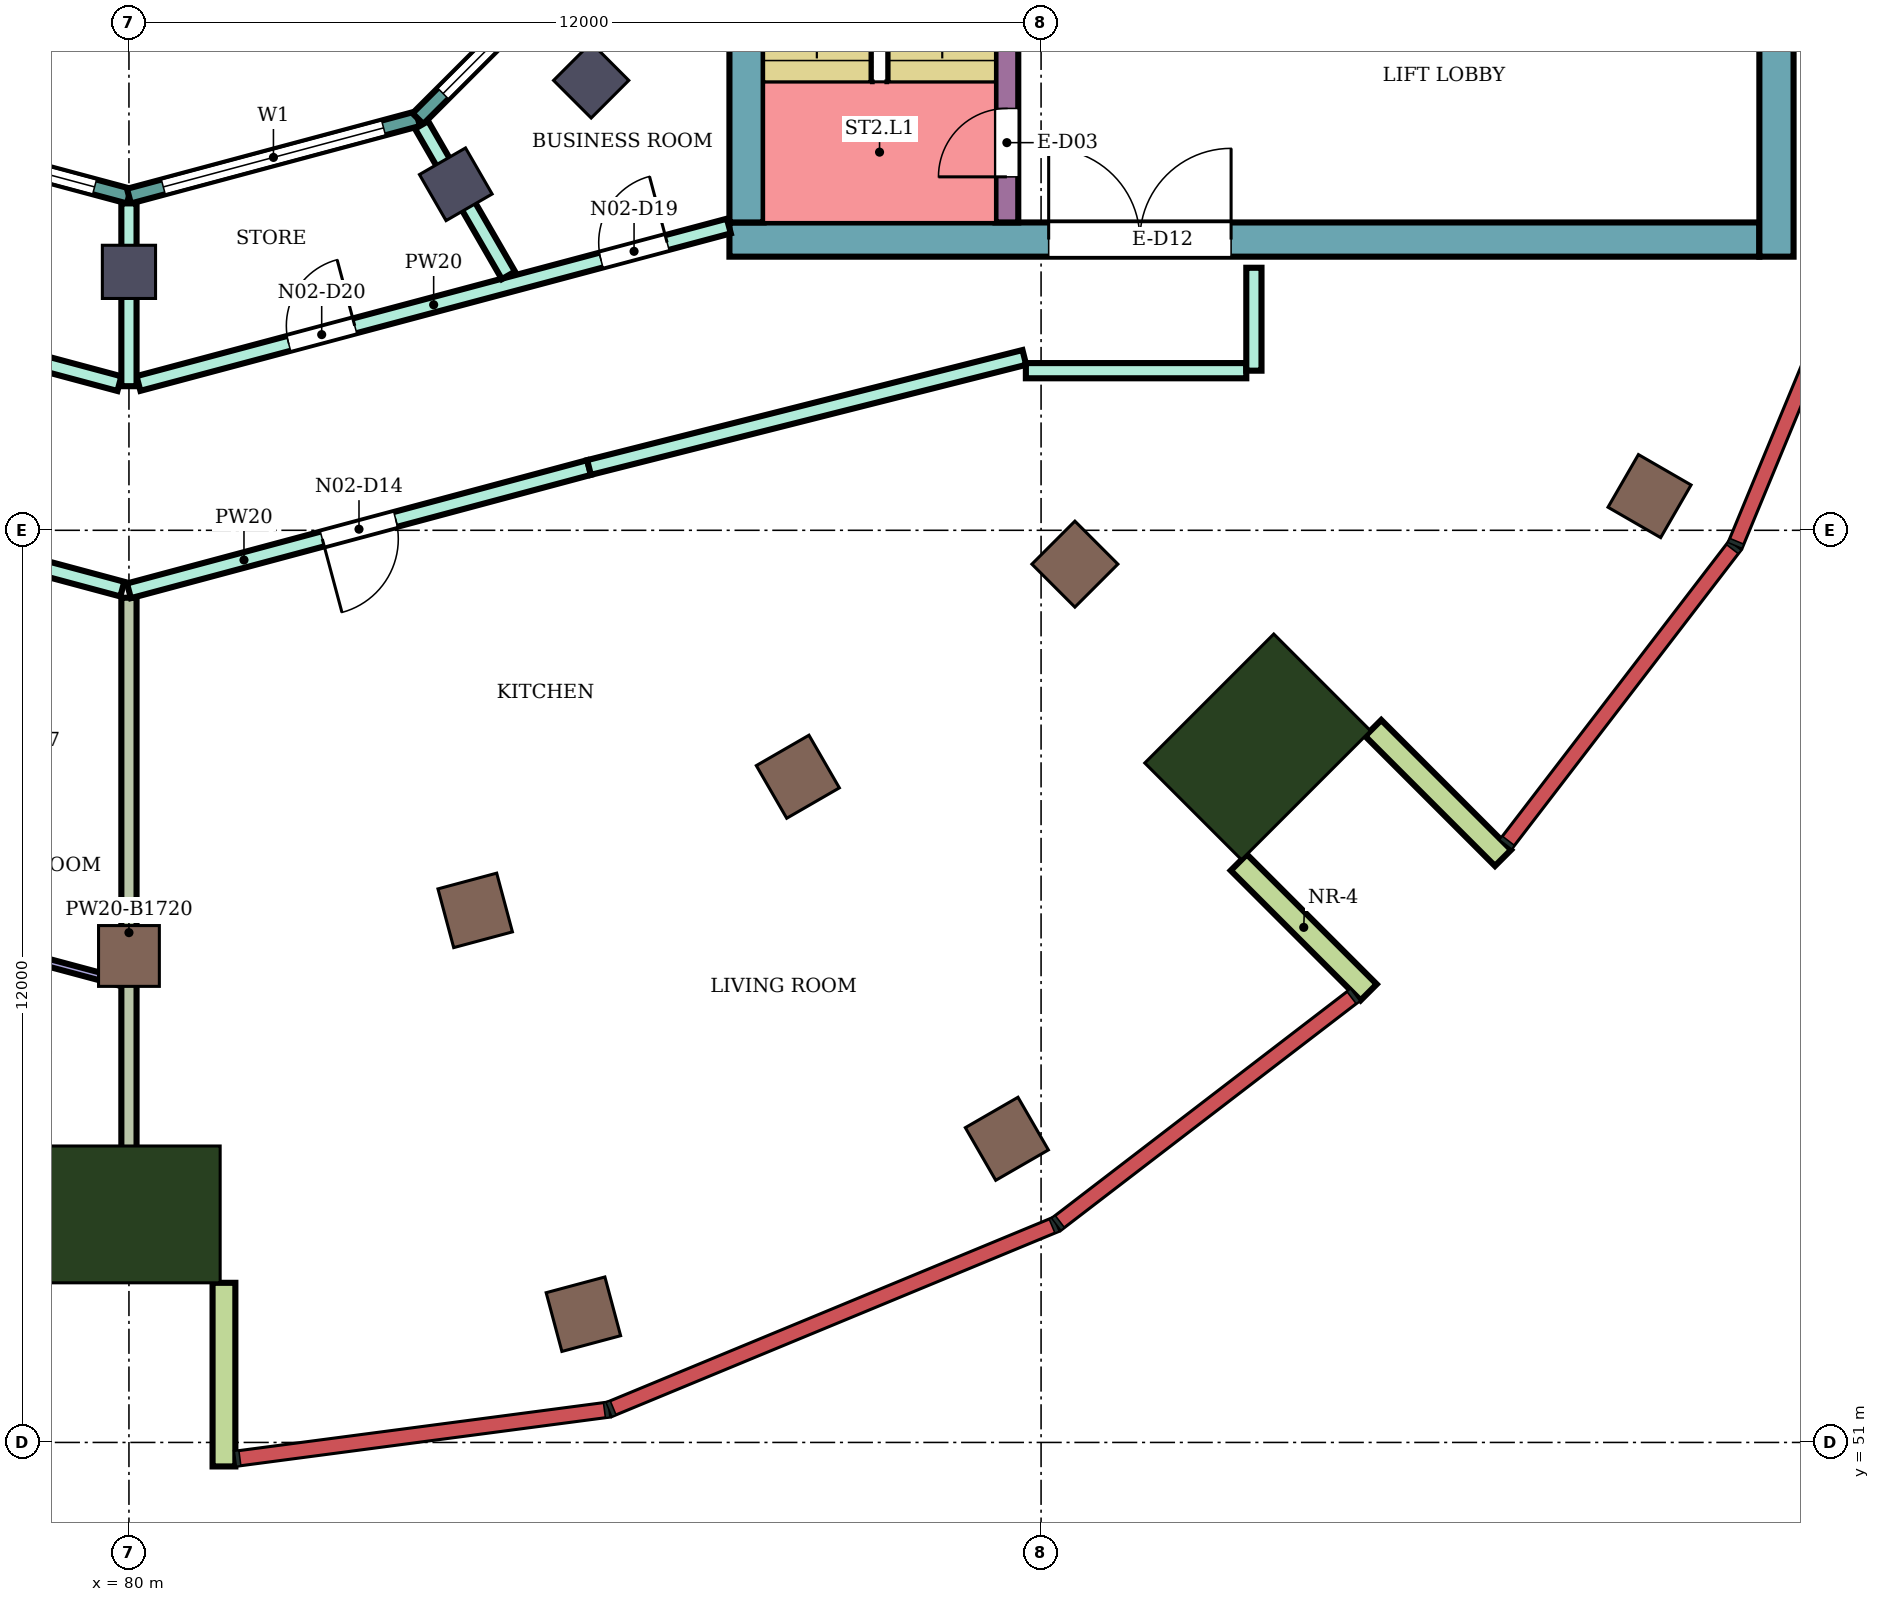
"""IFC4 building model, lengths in metres.
Left out: names, types, materials, properties, quantities, classifications, styles, units other than length and angle.
Written with IfcOpenShell. Run it as: python <this file> out.ifc"""

import sys

from ifc_helpers import new_model, si_unit, direction, frame, frame_2d, origin, origin_2d, place, context, subcontext, project, spatial, rectangle, extrude, element, fill, save


model = new_model("IFC4")
c1 = context("Model", 3, precision=1e-05, world=origin(), true_north=direction((0.0, 1.0)))
c2 = subcontext(c1, "Body", "Model", "MODEL_VIEW")
j1 = project(units=[si_unit("LENGTHUNIT", "METRE"), si_unit("PLANEANGLEUNIT", "RADIAN")], contexts=[c1])
p1 = place(None, origin())
s1 = spatial("IfcSite", under=j1, at=p1, CompositionType="ELEMENT")
p2 = place(p1, origin())
s2 = spatial("IfcBuilding", under=s1, at=p2, CompositionType="ELEMENT")
p3 = place(p2, frame((0.0, 0.0, 288.3)))
s3 = spatial("IfcBuildingStorey", under=s2, at=p3, CompositionType="ELEMENT", Elevation=288.3)
for number, where, z_axis, x_axis in (
    (1, (85.979, 52.687, 0.0), (0.0, 0.0, 1.0), (0.259, -0.966, 0.0)),
    (2, (91.55, 54.995, 0.0), (0.0, 0.0, 1.0), (0.5, -0.866, 0.0)),
    (3, (100.005, 63.45, 0.0), (0.0, 0.0, 1.0), (0.866, -0.5, 0.0)),
    (4, (80.0, 57.4, 0.0), (0.0, 0.0, 1.0), (0.0, -1.0, 0.0)),
    (5, (84.555, 58.0, 0.0), (0.0, 0.0, 1.0), (0.259, -0.966, 0.0)),
    (6, (88.8, 59.758, 0.0), (0.0, 0.0, 1.0), (0.5, -0.866, 0.0)),
    (7, (92.445, 62.555, 0.0), (0.0, 0.0, 1.0), (0.707, -0.707, 0.0)),
):
    element("IfcColumn", number, at=place(p3, frame(where, z_axis=z_axis, x_axis=x_axis)), inside=s3, PredefinedType="COLUMN", context=c2, shape_type="SweptSolid", body=[
        extrude(rectangle(XDim=0.8, YDim=0.8, at=origin_2d()), origin(), (0.0, 0.0, 1.0), 4.2),
    ])
for number, where, z_axis, x_axis in (
    (8, (80.0, 66.4, 0.0), (0.0, 0.0, 1.0), (0.0, -1.0, 0.0)),
    (9, (84.3, 67.552, 0.0), (0.0, 0.0, 1.0), (0.5, -0.866, 0.0)),
    (10, (86.081, 68.919, 0.0), (0.0, 0.0, 1.0), (0.707, -0.707, 0.0)),
):
    element("IfcColumn", number, at=place(p3, frame(where, z_axis=z_axis, x_axis=x_axis)), inside=s3, PredefinedType="COLUMN", context=c2, shape_type="SweptSolid", body=[
        extrude(rectangle(XDim=0.7, YDim=0.7, at=origin_2d()), origin(), (0.0, 0.0, 1.0), 4.2),
    ])
for number, where, z_axis, x_axis in (
    (11, (80.0, 54.0, 0.0), (0.0, 0.0, 1.0), (0.0, -1.0, 0.0)),
    (12, (94.849, 60.151, 0.0), (0.0, 0.0, 1.0), (0.707, -0.707, 0.0)),
):
    element("IfcColumn", number, at=place(p3, frame(where, z_axis=z_axis, x_axis=x_axis)), inside=s3, PredefinedType="COLUMN", context=c2, shape_type="SweptSolid", body=[
        extrude(rectangle(XDim=1.8, YDim=2.4, at=origin_2d()), origin(), (0.0, 0.0, 1.0), 4.2),
    ])
p4 = place(p3, frame((87.9, 66.825, 0.0), z_axis=(0.0, 0.0, 1.0), x_axis=(1.0, 0.0, 0.0)))
e13 = element("IfcWall", 13, at=p4, inside=s3, PredefinedType="SHEAR", context=c2, shape_type="SweptSolid", body=[
    extrude(rectangle(XDim=13.55, YDim=0.45, at=frame_2d((6.775, 0.0))), origin(), (0.0, 0.0, 1.0), 3.88),
])
p5 = place(p4, frame((4.2, 0.0, 0.0)))
e14 = element("IfcOpeningElement", 14, at=p5, cuts=e13, PredefinedType="OPENING", context=c2, shape_type="SweptSolid", body=[
    extrude(rectangle(XDim=2.4, YDim=2.4, at=frame_2d((1.2, 1.2))), frame((0.0, 0.235, 0.0), z_axis=(0.0, -1.0, 0.0), x_axis=(1.0, 0.0, 0.0)), (0.0, 0.0, 1.0), 0.47),
])
p6 = place(p3, frame((88.125, 67.05, 0.0), z_axis=(0.0, 0.0, 1.0), x_axis=(0.0, 1.0, 0.0)))
e15 = element("IfcWall", 15, at=p6, inside=s3, PredefinedType="SHEAR", context=c2, shape_type="SweptSolid", body=[
    extrude(rectangle(XDim=7.95, YDim=0.45, at=frame_2d((3.975, 0.0))), origin(), (0.0, 0.0, 1.0), 3.88),
])
p7 = place(p3, frame((101.675, 66.6, 0.0), z_axis=(0.0, 0.0, 1.0), x_axis=(0.0, 1.0, 0.0)))
e16 = element("IfcWall", 16, at=p7, inside=s3, PredefinedType="SHEAR", context=c2, shape_type="SweptSolid", body=[
    extrude(rectangle(XDim=16.8, YDim=0.45, at=frame_2d((8.4, 0.0))), origin(), (0.0, 0.0, 1.0), 3.88),
])
p8 = place(p3, frame((91.55, 67.05, 0.0), z_axis=(0.0, 0.0, 1.0), x_axis=(0.0, 1.0, 0.0)))
e17 = element("IfcWall", 17, at=p8, inside=s3, PredefinedType="SHEAR", context=c2, shape_type="SweptSolid", body=[
    extrude(rectangle(XDim=7.95, YDim=0.3, at=frame_2d((3.975, 0.0))), origin(), (0.0, 0.0, 1.0), 3.88),
])
p9 = place(p8, frame((0.6, 0.0, 0.0)))
e18 = element("IfcOpeningElement", 18, at=p9, cuts=e17, PredefinedType="OPENING", context=c2, shape_type="SweptSolid", body=[
    extrude(rectangle(XDim=0.9, YDim=2.1, at=frame_2d((0.45, 1.05))), frame((0.0, 0.16, 0.0), z_axis=(0.0, -1.0, 0.0), x_axis=(1.0, 0.0, 0.0)), (0.0, 0.0, 1.0), 0.32),
])
p10 = place(p3, frame((81.25, 53.1, 0.0), z_axis=(0.0, 0.0, 1.0), x_axis=(0.0, -1.0, 0.0)))
e19 = element("IfcWall", 19, at=p10, inside=s3, PredefinedType="NOTDEFINED", context=c2, shape_type="SweptSolid", body=[
    extrude(rectangle(XDim=2.416, YDim=0.3, at=frame_2d((1.208, 0.0))), origin(), (0.0, 0.0, 1.0), 4.2),
])
for number, where, z_axis, x_axis in (
    (20, (94.602, 58.63, 0.0), (0.0, 0.0, 1.0), (0.707, -0.707, 0.0)),
    (21, (96.37, 60.398, 0.0), (0.0, 0.0, 1.0), (0.707, -0.707, 0.0)),
):
    element("IfcWall", number, at=place(p3, frame(where, z_axis=z_axis, x_axis=x_axis)), inside=s3, PredefinedType="NOTDEFINED", context=c2, shape_type="SweptSolid", body=[
        extrude(rectangle(XDim=2.416, YDim=0.3, at=frame_2d((1.208, 0.0))), origin(), (0.0, 0.0, 1.0), 4.2),
    ])
p11 = place(p3, frame((76.198, 68.415, 0.0), z_axis=(0.0, 0.0, 1.0), x_axis=(0.965933654434, -0.258789828301, 0.0)))
e22 = element("IfcWall", 22, at=p11, inside=s3, PredefinedType="NOTDEFINED", context=c2, shape_type="SweptSolid", body=[
    extrude(rectangle(XDim=3.936, YDim=0.2, at=frame_2d((1.968, 0.0))), origin(), (0.0, 0.0, 1.0), 4.2),
])
p12 = place(p11, frame((0.468, 0.0, 0.9)))
e23 = element("IfcOpeningElement", 23, at=p12, cuts=e22, PredefinedType="OPENING", context=c2, shape_type="SweptSolid", body=[
    extrude(rectangle(XDim=3.0, YDim=2.3, at=frame_2d((1.5, 1.15))), frame((0.0, 0.11, 0.0), z_axis=(0.0, -1.0, 0.0), x_axis=(1.0, 0.0, 0.0)), (0.0, 0.0, 1.0), 0.22),
])
p13 = place(p3, frame((80.0, 67.396, 0.0), z_axis=(0.0, 0.0, 1.0), x_axis=(0.965933654434, 0.258789828301, 0.0)))
e24 = element("IfcWall", 24, at=p13, inside=s3, PredefinedType="NOTDEFINED", context=c2, shape_type="SweptSolid", body=[
    extrude(rectangle(XDim=3.936, YDim=0.2, at=frame_2d((1.968, 0.0))), origin(), (0.0, 0.0, 1.0), 4.2),
])
p14 = place(p13, frame((0.468, 0.0, 0.9)))
e25 = element("IfcOpeningElement", 25, at=p14, cuts=e24, PredefinedType="OPENING", context=c2, shape_type="SweptSolid", body=[
    extrude(rectangle(XDim=3.0, YDim=2.3, at=frame_2d((1.5, 1.15))), frame((0.0, 0.11, 0.0), z_axis=(0.0, -1.0, 0.0), x_axis=(1.0, 0.0, 0.0)), (0.0, 0.0, 1.0), 0.22),
])
p15 = place(p3, frame((83.802, 68.415, 0.0), z_axis=(0.0, 0.0, 1.0), x_axis=(0.707106781187, 0.707106781187, 0.0)))
e26 = element("IfcWall", 26, at=p15, inside=s3, PredefinedType="NOTDEFINED", context=c2, shape_type="SweptSolid", body=[
    extrude(rectangle(XDim=3.936, YDim=0.2, at=frame_2d((1.968, 0.0))), origin(), (0.0, 0.0, 1.0), 4.2),
])
p16 = place(p15, frame((0.468, 0.0, 0.9)))
e27 = element("IfcOpeningElement", 27, at=p16, cuts=e26, PredefinedType="OPENING", context=c2, shape_type="SweptSolid", body=[
    extrude(rectangle(XDim=3.0, YDim=2.3, at=frame_2d((1.5, 1.15))), frame((0.0, 0.11, 0.0), z_axis=(0.0, -1.0, 0.0), x_axis=(1.0, 0.0, 0.0)), (0.0, 0.0, 1.0), 0.22),
])
p17 = place(p3, frame((73.947, 63.826, 0.0), z_axis=(0.0, 0.0, 1.0), x_axis=(0.965862619462, -0.259054821082, 0.0)))
e28 = element("IfcWall", 28, at=p17, inside=s3, PredefinedType="PARTITIONING", context=c2, shape_type="SweptSolid", body=[
    extrude(rectangle(XDim=6.177, YDim=0.2, at=frame_2d((3.088, 0.0))), origin(), (0.0, 0.0, 1.0), 3.75),
])
p18 = place(p17, frame((3.336, 0.0, 0.0)))
e29 = element("IfcOpeningElement", 29, at=p18, cuts=e28, PredefinedType="OPENING", context=c2, shape_type="SweptSolid", body=[
    extrude(rectangle(XDim=1.0, YDim=2.1, at=frame_2d((0.5, 1.05))), frame((0.0, 0.11, 0.0), z_axis=(0.0, -1.0, 0.0), x_axis=(1.0, 0.0, 0.0)), (0.0, 0.0, 1.0), 0.22),
])
p19 = place(p3, frame((74.603, 66.342, 0.0), z_axis=(0.0, 0.0, 1.0), x_axis=(0.965920893652, -0.258837453254, 0.0)))
e30 = element("IfcWall", 30, at=p19, inside=s3, PredefinedType="PARTITIONING", context=c2, shape_type="SweptSolid", body=[
    extrude(rectangle(XDim=5.458, YDim=0.2, at=frame_2d((2.729, 0.0))), origin(), (0.0, 0.0, 1.0), 3.75),
])
p20 = place(p19, frame((2.512, 0.0, 0.0)))
e31 = element("IfcOpeningElement", 31, at=p20, cuts=e30, PredefinedType="OPENING", context=c2, shape_type="SweptSolid", body=[
    extrude(rectangle(XDim=0.9, YDim=2.1, at=frame_2d((0.45, 1.05))), frame((0.0, 0.11, 0.0), z_axis=(0.0, -1.0, 0.0), x_axis=(1.0, 0.0, 0.0)), (0.0, 0.0, 1.0), 0.22),
])
p21 = place(p3, frame((80.125, 64.932, 0.0), z_axis=(0.0, 0.0, 1.0), x_axis=(0.966236955806, 0.257655089674, 0.0)))
e32 = element("IfcWall", 32, at=p21, inside=s3, PredefinedType="PARTITIONING", context=c2, shape_type="SweptSolid", body=[
    extrude(rectangle(XDim=8.039, YDim=0.2, at=frame_2d((4.02, 0.0))), origin(), (0.0, 0.0, 1.0), 3.75),
])
p22 = place(p21, frame((6.298, 0.0, 0.0)))
e33 = element("IfcOpeningElement", 33, at=p22, cuts=e32, PredefinedType="OPENING", context=c2, shape_type="SweptSolid", body=[
    extrude(rectangle(XDim=0.9, YDim=2.1, at=frame_2d((0.45, 1.05))), frame((0.0, 0.11, 0.0), z_axis=(0.0, -1.0, 0.0), x_axis=(1.0, 0.0, 0.0)), (0.0, 0.0, 1.0), 0.22),
])
p23 = place(p21, frame((2.045, 0.0, 0.0)))
e34 = element("IfcOpeningElement", 34, at=p23, cuts=e32, PredefinedType="OPENING", context=c2, shape_type="SweptSolid", body=[
    extrude(rectangle(XDim=0.9, YDim=2.1, at=frame_2d((0.45, 1.05))), frame((0.0, 0.11, 0.0), z_axis=(0.0, -1.0, 0.0), x_axis=(1.0, 0.0, 0.0)), (0.0, 0.0, 1.0), 0.22),
])
p24 = place(p3, frame((80.0, 53.301, 0.0), z_axis=(0.0, 0.0, 1.0), x_axis=(0.0, 1.0, 0.0)))
e35 = element("IfcWall", 35, at=p24, inside=s3, PredefinedType="PARTITIONING", context=c2, shape_type="SweptSolid", body=[
    extrude(rectangle(XDim=8.812, YDim=0.2, at=frame_2d((4.406, 0.0))), origin(), (0.0, 0.0, 1.0), 2.48),
])
p25 = place(p3, frame((80.0, 62.204, 0.0), z_axis=(0.0, 0.0, 1.0), x_axis=(0.965918660596, 0.258845786351, 0.0)))
e36 = element("IfcWall", 36, at=p25, inside=s3, PredefinedType="PARTITIONING", context=c2, shape_type="SweptSolid", body=[
    extrude(rectangle(XDim=6.267, YDim=0.2, at=frame_2d((3.133, 0.0))), origin(), (0.0, 0.0, 1.0), 3.75),
])
p26 = place(p25, frame((2.633, 0.0, 0.0)))
e37 = element("IfcOpeningElement", 37, at=p26, cuts=e36, PredefinedType="OPENING", context=c2, shape_type="SweptSolid", body=[
    extrude(rectangle(XDim=1.0, YDim=2.1, at=frame_2d((0.5, 1.05))), frame((0.0, 0.11, 0.0), z_axis=(0.0, -1.0, 0.0), x_axis=(1.0, 0.0, 0.0)), (0.0, 0.0, 1.0), 0.22),
])
p27 = place(p3, frame((80.0, 64.896, 0.0), z_axis=(0.0, 0.0, 1.0), x_axis=(0.0, 1.0, 0.0)))
e38 = element("IfcWall", 38, at=p27, inside=s3, PredefinedType="PARTITIONING", context=c2, shape_type="SweptSolid", body=[
    extrude(rectangle(XDim=2.405, YDim=0.2, at=frame_2d((1.203, 0.0))), origin(), (0.0, 0.0, 1.0), 3.75),
])
p28 = place(p3, frame((83.85, 68.333, 0.0), z_axis=(0.0, 0.0, 1.0), x_axis=(0.500080019051, -0.865979199835, 0.0)))
e39 = element("IfcWall", 39, at=p28, inside=s3, PredefinedType="PARTITIONING", context=c2, shape_type="SweptSolid", body=[
    extrude(rectangle(XDim=2.285, YDim=0.2, at=frame_2d((1.143, 0.0))), origin(), (0.0, 0.0, 1.0), 3.75),
])
p29 = place(p3, frame((86.053, 63.826, 0.0), z_axis=(0.0, 0.0, 1.0), x_axis=(0.969480070232, 0.245170131586, 0.0)))
e40 = element("IfcWall", 40, at=p29, inside=s3, PredefinedType="PARTITIONING", context=c2, shape_type="SweptSolid", body=[
    extrude(rectangle(XDim=5.907, YDim=0.2, at=frame_2d((2.954, 0.0))), origin(), (0.0, 0.0, 1.0), 3.75),
])
p30 = place(p3, frame((91.8, 65.1, 0.0), z_axis=(0.0, 0.0, 1.0), x_axis=(1.0, 0.0, 0.0)))
e41 = element("IfcWall", 41, at=p30, inside=s3, PredefinedType="PARTITIONING", context=c2, shape_type="SweptSolid", body=[
    extrude(rectangle(XDim=2.9, YDim=0.2, at=frame_2d((1.45, 0.0))), origin(), (0.0, 0.0, 1.0), 3.75),
])
p31 = place(p3, frame((94.8, 65.1, 0.0), z_axis=(0.0, 0.0, 1.0), x_axis=(0.0, 1.0, 0.0)))
e42 = element("IfcWall", 42, at=p31, inside=s3, PredefinedType="PARTITIONING", context=c2, shape_type="SweptSolid", body=[
    extrude(rectangle(XDim=1.354, YDim=0.2, at=frame_2d((0.677, 0.0))), origin(), (0.0, 0.0, 1.0), 3.75),
])
p32 = place(p3, frame((75.604, 58.205, 0.0), z_axis=(0.0, 0.0, 1.0), x_axis=(0.96596252401, -0.258682048483, 0.0)))
e43 = element("IfcWall", 43, at=p32, inside=s3, PredefinedType="PARTITIONING", context=c2, shape_type="SweptSolid", body=[
    extrude(rectangle(XDim=4.441, YDim=0.1, at=frame_2d((2.221, 0.0))), origin(), (0.0, 0.0, 1.0), 3.38),
])
p33 = place(p32, frame((0.362, 0.0, 0.0)))
e44 = element("IfcOpeningElement", 44, at=p33, cuts=e43, PredefinedType="OPENING", context=c2, shape_type="SweptSolid", body=[
    extrude(rectangle(XDim=0.9, YDim=2.1, at=frame_2d((0.45, 1.05))), frame((0.0, 0.06, 0.0), z_axis=(0.0, -1.0, 0.0), x_axis=(1.0, 0.0, 0.0)), (0.0, 0.0, 1.0), 0.12),
])
p34 = place(p12, origin())
e45 = element("IfcWindow", 45, at=p34, inside=s3, PartitioningType="SINGLE_PANEL", PredefinedType="WINDOW", context=c2, shape_type="SweptSolid", body=[
    extrude(rectangle(XDim=3.0, YDim=2.3, at=frame_2d((1.5, 1.15))), frame((0.0, 0.03, 0.0), z_axis=(0.0, -1.0, 0.0), x_axis=(1.0, 0.0, 0.0)), (0.0, 0.0, 1.0), 0.06),
])
fill(e23, e45)
p35 = place(p14, origin())
e46 = element("IfcWindow", 46, at=p35, inside=s3, PartitioningType="SINGLE_PANEL", PredefinedType="WINDOW", context=c2, shape_type="SweptSolid", body=[
    extrude(rectangle(XDim=3.0, YDim=2.3, at=frame_2d((1.5, 1.15))), frame((0.0, 0.03, 0.0), z_axis=(0.0, -1.0, 0.0), x_axis=(1.0, 0.0, 0.0)), (0.0, 0.0, 1.0), 0.06),
])
fill(e25, e46)
p36 = place(p16, origin())
e47 = element("IfcWindow", 47, at=p36, inside=s3, PartitioningType="SINGLE_PANEL", PredefinedType="WINDOW", context=c2, shape_type="SweptSolid", body=[
    extrude(rectangle(XDim=3.0, YDim=2.3, at=frame_2d((1.5, 1.15))), frame((0.0, 0.03, 0.0), z_axis=(0.0, -1.0, 0.0), x_axis=(1.0, 0.0, 0.0)), (0.0, 0.0, 1.0), 0.06),
])
fill(e27, e47)
p37 = place(p26, frame((1.0, 0.0, 0.0), z_axis=(0.0, 0.0, 1.0), x_axis=(-1.0, 0.0, 0.0)))
e48 = element("IfcDoor", 48, at=p37, inside=s3, OperationType="SINGLE_SWING_RIGHT", PredefinedType="DOOR", context=c2, shape_type="SweptSolid", body=[
    extrude(rectangle(XDim=1.0, YDim=2.1, at=frame_2d((0.5, 1.05))), frame((0.0, 0.025, 0.0), z_axis=(0.0, -1.0, 0.0), x_axis=(1.0, 0.0, 0.0)), (0.0, 0.0, 1.0), 0.05),
])
fill(e37, e48)
p38 = place(p22, origin())
e49 = element("IfcDoor", 49, at=p38, inside=s3, OperationType="SINGLE_SWING_RIGHT", PredefinedType="DOOR", context=c2, shape_type="SweptSolid", body=[
    extrude(rectangle(XDim=0.9, YDim=2.1, at=frame_2d((0.45, 1.05))), frame((0.0, 0.025, 0.0), z_axis=(0.0, -1.0, 0.0), x_axis=(1.0, 0.0, 0.0)), (0.0, 0.0, 1.0), 0.05),
])
fill(e33, e49)
p39 = place(p23, origin())
e50 = element("IfcDoor", 50, at=p39, inside=s3, OperationType="SINGLE_SWING_RIGHT", PredefinedType="DOOR", context=c2, shape_type="SweptSolid", body=[
    extrude(rectangle(XDim=0.9, YDim=2.1, at=frame_2d((0.45, 1.05))), frame((0.0, 0.025, 0.0), z_axis=(0.0, -1.0, 0.0), x_axis=(1.0, 0.0, 0.0)), (0.0, 0.0, 1.0), 0.05),
])
fill(e34, e50)
p40 = place(p9, origin())
e51 = element("IfcDoor", 51, at=p40, inside=s3, OperationType="SINGLE_SWING_LEFT", PredefinedType="DOOR", context=c2, shape_type="SweptSolid", body=[
    extrude(rectangle(XDim=0.9, YDim=2.1, at=frame_2d((0.45, 1.05))), frame((0.0, 0.025, 0.0), z_axis=(0.0, -1.0, 0.0), x_axis=(1.0, 0.0, 0.0)), (0.0, 0.0, 1.0), 0.05),
])
fill(e18, e51)
p41 = place(p5, origin())
e52 = element("IfcDoor", 52, at=p41, inside=s3, OperationType="DOUBLE_DOOR_SINGLE_SWING", PredefinedType="DOOR", context=c2, shape_type="SweptSolid", body=[
    extrude(rectangle(XDim=2.4, YDim=2.4, at=frame_2d((1.2, 1.2))), frame((0.0, 0.025, 0.0), z_axis=(0.0, -1.0, 0.0), x_axis=(1.0, 0.0, 0.0)), (0.0, 0.0, 1.0), 0.05),
])
fill(e14, e52)
save(model, sys.argv[1])
